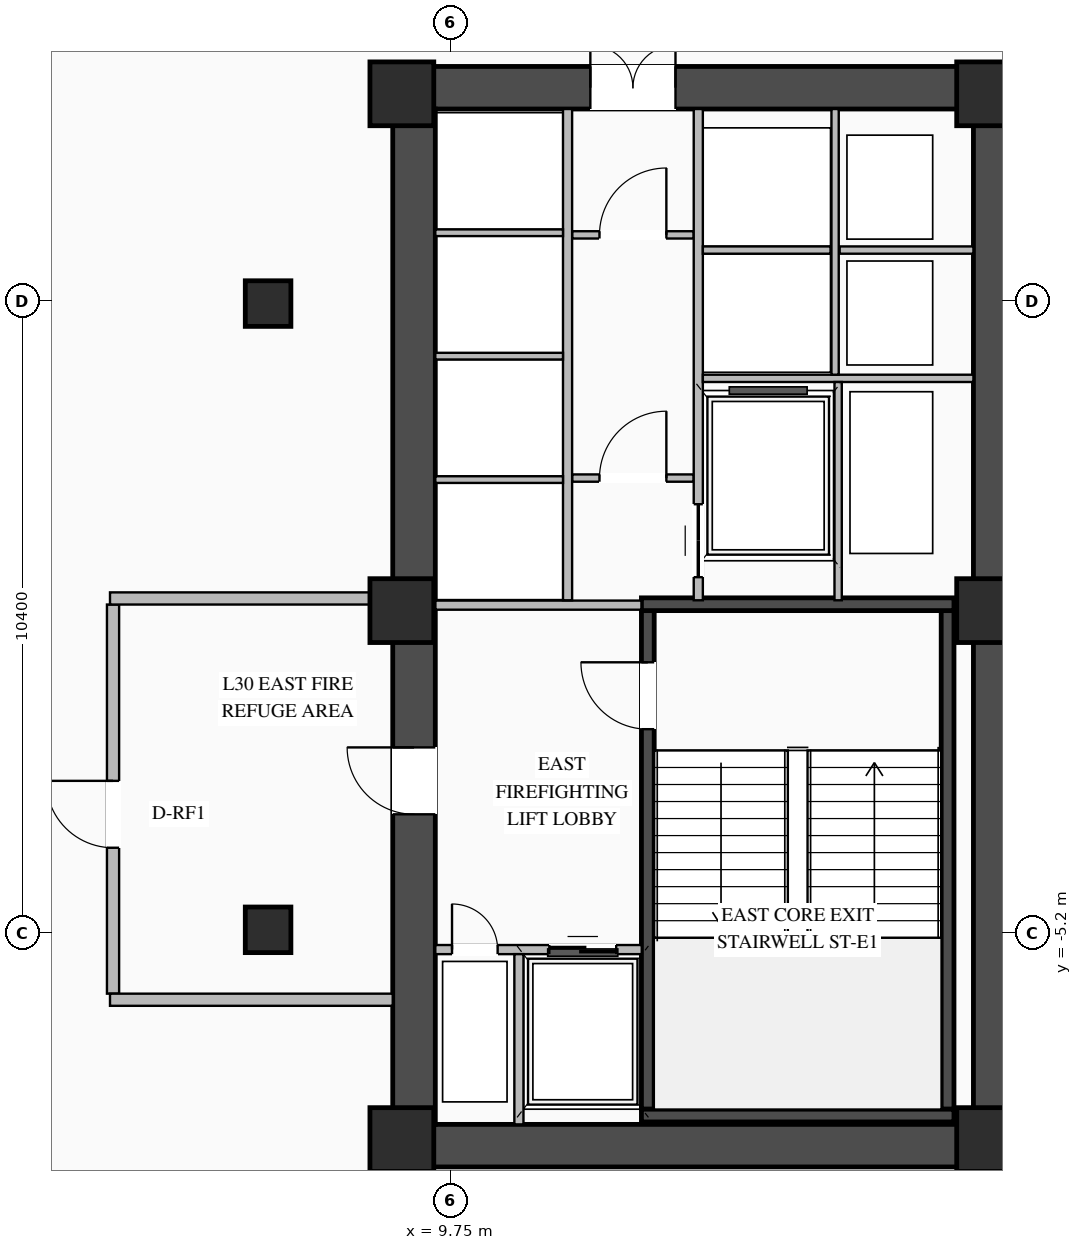
"""IFC4 building model, lengths in metres.
Left out: names, types, materials, properties, quantities, classifications, styles, units other than length and angle.
Written with IfcOpenShell. Run it as: python <this file> out.ifc"""

import sys

from ifc_helpers import new_model, si_unit, direction, frame, frame_2d, origin, origin_2d, place, context, subcontext, project, spatial, rectangle, i_section, extrude, element, fill, save


model = new_model("IFC4")
c1 = context("Model", 3, precision=1e-05, world=origin(), true_north=direction((0.0, 1.0)))
c2 = subcontext(c1, "Body", "Model", "MODEL_VIEW")
j1 = project(units=[si_unit("LENGTHUNIT", "METRE"), si_unit("PLANEANGLEUNIT", "RADIAN")], contexts=[c1])
p1 = place(None, origin())
s1 = spatial("IfcSite", under=j1, at=p1, CompositionType="ELEMENT")
p2 = place(p1, origin())
s2 = spatial("IfcBuilding", under=s1, at=p2, CompositionType="ELEMENT")
p3 = place(p2, frame((0.0, 0.0, 112.15)))
s3 = spatial("IfcBuildingStorey", under=s2, at=p3, CompositionType="ELEMENT", Elevation=112.15)
p4 = place(p3, frame((8.8, -8.7, 0.0), z_axis=(0.0, 0.0, 1.0), x_axis=(1.0, 0.0, 0.0)))
e1 = element("IfcWall", 1, at=p4, inside=s3, PredefinedType="SHEAR", context=c2, shape_type="SweptSolid", body=[
    extrude(rectangle(XDim=10.25, YDim=0.7, at=frame_2d((5.125, 0.0))), origin(), (0.0, 0.0, 1.0), 4.22),
])
p5 = place(p3, frame((8.8, 8.7, 0.0), z_axis=(0.0, 0.0, 1.0), x_axis=(1.0, 0.0, 0.0)))
e2 = element("IfcWall", 2, at=p5, inside=s3, PredefinedType="SHEAR", context=c2, shape_type="SweptSolid", body=[
    extrude(rectangle(XDim=10.25, YDim=0.7, at=frame_2d((5.125, 0.0))), origin(), (0.0, 0.0, 1.0), 4.22),
])
p6 = place(p5, frame((3.25, 0.0, 0.0)))
e3 = element("IfcOpeningElement", 3, at=p6, cuts=e2, PredefinedType="OPENING", context=c2, shape_type="SweptSolid", body=[
    extrude(rectangle(XDim=1.4, YDim=2.05, at=frame_2d((0.7, 1.025))), frame((0.0, 0.36, 0.0), z_axis=(0.0, -1.0, 0.0), x_axis=(1.0, 0.0, 0.0)), (0.0, 0.0, 1.0), 0.72),
])
p7 = place(p3, frame((9.15, -8.35, 0.0), z_axis=(0.0, 0.0, 1.0), x_axis=(0.0, 1.0, 0.0)))
e4 = element("IfcWall", 4, at=p7, inside=s3, PredefinedType="SHEAR", context=c2, shape_type="SweptSolid", body=[
    extrude(rectangle(XDim=16.7, YDim=0.7, at=frame_2d((8.35, 0.0))), origin(), (0.0, 0.0, 1.0), 4.22),
])
p8 = place(p7, frame((5.1, 0.0, 0.0)))
e5 = element("IfcOpeningElement", 5, at=p8, cuts=e4, PredefinedType="OPENING", context=c2, shape_type="SweptSolid", body=[
    extrude(rectangle(XDim=1.1, YDim=2.08, at=frame_2d((0.55, 1.04))), frame((0.0, 0.36, 0.0), z_axis=(0.0, -1.0, 0.0), x_axis=(1.0, 0.0, 0.0)), (0.0, 0.0, 1.0), 0.72),
])
p9 = place(p3, frame((18.7, -8.35, 0.0), z_axis=(0.0, 0.0, 1.0), x_axis=(0.0, 1.0, 0.0)))
e6 = element("IfcWall", 6, at=p9, inside=s3, PredefinedType="SHEAR", context=c2, shape_type="SweptSolid", body=[
    extrude(rectangle(XDim=16.7, YDim=0.7, at=frame_2d((8.35, 0.0))), origin(), (0.0, 0.0, 1.0), 4.22),
])
p10 = place(p3, frame((12.995, -8.1, 0.0), z_axis=(0.0, 0.0, 1.0), x_axis=(0.0, 1.0, 0.0)))
e7 = element("IfcWall", 7, at=p10, inside=s3, PredefinedType="SHEAR", context=c2, shape_type="SweptSolid", body=[
    extrude(rectangle(XDim=8.2, YDim=0.21, at=frame_2d((4.1, 0.0))), origin(), (0.0, 0.0, 1.0), 4.22),
])
p11 = place(p10, frame((6.25, 0.0, 0.0)))
e8 = element("IfcOpeningElement", 8, at=p11, cuts=e7, PredefinedType="OPENING", context=c2, shape_type="SweptSolid", body=[
    extrude(rectangle(XDim=1.1, YDim=2.15, at=frame_2d((0.55, 1.075))), frame((0.0, 0.115, 0.0), z_axis=(0.0, -1.0, 0.0), x_axis=(1.0, 0.0, 0.0)), (0.0, 0.0, 1.0), 0.23),
])
p12 = place(p3, frame((17.925, -8.1, 0.0), z_axis=(0.0, 0.0, 1.0), x_axis=(0.0, 1.0, 0.0)))
e9 = element("IfcWall", 9, at=p12, inside=s3, PredefinedType="SHEAR", context=c2, shape_type="SweptSolid", body=[
    extrude(rectangle(XDim=8.2, YDim=0.21, at=frame_2d((4.1, 0.0))), origin(), (0.0, 0.0, 1.0), 4.22),
])
for number, where, z_axis, x_axis in (
    (10, (12.89, -8.205, 0.0), (0.0, 0.0, 1.0), (1.0, 0.0, 0.0)),
    (11, (18.03, 0.205, 0.0), (0.0, 0.0, 1.0), (-1.0, 0.0, 0.0)),
):
    element("IfcWall", number, at=place(p3, frame(where, z_axis=z_axis, x_axis=x_axis)), inside=s3, PredefinedType="SHEAR", context=c2, shape_type="SweptSolid", body=[
        extrude(rectangle(XDim=5.14, YDim=0.21, at=frame_2d((2.57, 0.0))), origin(), (0.0, 0.0, 1.0), 4.22),
    ])
for number, where, z_axis, x_axis in (
    (12, (8.95, -8.6, 0.0), (0.0, 0.0, 1.0), (1.0, 0.0, 0.0)),
    (13, (8.95, 0.1, 0.0), (0.0, 0.0, 1.0), (1.0, 0.0, 0.0)),
    (14, (8.95, 8.6, 0.0), (0.0, 0.0, 1.0), (1.0, 0.0, 0.0)),
    (15, (18.6, -8.6, 0.0), (0.0, 0.0, 1.0), (1.0, 0.0, 0.0)),
    (16, (18.6, 0.1, 0.0), (0.0, 0.0, 1.0), (1.0, 0.0, 0.0)),
    (17, (18.6, 8.6, 0.0), (0.0, 0.0, 1.0), (1.0, 0.0, 0.0)),
):
    element("IfcColumn", number, at=place(p3, frame(where, z_axis=z_axis, x_axis=x_axis)), inside=s3, PredefinedType="COLUMN", context=c2, shape_type="SweptSolid", body=[
        extrude(rectangle(XDim=1.05, YDim=1.05, at=origin_2d()), origin(), (0.0, 0.0, 1.0), 4.5),
    ])
for number, where, z_axis, x_axis in (
    (18, (6.75, -5.15, 0.0), (0.0, 0.0, 1.0), (1.0, 0.0, 0.0)),
    (19, (6.75, 5.15, 0.0), (0.0, 0.0, 1.0), (1.0, 0.0, 0.0)),
):
    element("IfcColumn", number, at=place(p3, frame(where, z_axis=z_axis, x_axis=x_axis)), inside=s3, PredefinedType="COLUMN", context=c2, shape_type="SweptSolid", body=[
        extrude(i_section(OverallWidth=0.75, OverallDepth=0.75, WebThickness=0.03, FlangeThickness=0.044, at=origin_2d()), origin(), (0.0, 0.0, 1.0), 4.5),
    ])
p13 = place(p3, frame((9.5, -5.475, 0.0), z_axis=(0.0, 0.0, 1.0), x_axis=(1.0, 0.0, 0.0)))
e20 = element("IfcWall", 20, at=p13, inside=s3, PredefinedType="STANDARD", context=c2, shape_type="SweptSolid", body=[
    extrude(rectangle(XDim=3.395, YDim=0.15, at=frame_2d((1.698, 0.0))), origin(), (0.0, 0.0, 1.0), 4.2),
])
p14 = place(p13, frame((1.875, 0.0, 0.0)))
e21 = element("IfcOpeningElement", 21, at=p14, cuts=e20, PredefinedType="OPENING", context=c2, shape_type="SweptSolid", body=[
    extrude(rectangle(XDim=1.1, YDim=2.15, at=frame_2d((0.55, 1.075))), frame((0.0, 0.085, 0.0), z_axis=(0.0, -1.0, 0.0), x_axis=(1.0, 0.0, 0.0)), (0.0, 0.0, 1.0), 0.17),
])
p15 = place(p13, frame((0.275, 0.0, 0.0)))
e22 = element("IfcOpeningElement", 22, at=p15, cuts=e20, PredefinedType="OPENING", context=c2, shape_type="SweptSolid", body=[
    extrude(rectangle(XDim=0.75, YDim=2.05, at=frame_2d((0.375, 1.025))), frame((0.0, 0.085, 0.0), z_axis=(0.0, -1.0, 0.0), x_axis=(1.0, 0.0, 0.0)), (0.0, 0.0, 1.0), 0.17),
])
p16 = place(p3, frame((10.875, -8.35, 0.0), z_axis=(0.0, 0.0, 1.0), x_axis=(0.0, 1.0, 0.0)))
e23 = element("IfcWall", 23, at=p16, inside=s3, PredefinedType="STANDARD", context=c2, shape_type="SweptSolid", body=[
    extrude(rectangle(XDim=2.8, YDim=0.15, at=frame_2d((1.4, 0.0))), origin(), (0.0, 0.0, 1.0), 4.2),
])
p17 = place(p3, frame((9.5, 0.19, 0.0), z_axis=(0.0, 0.0, 1.0), x_axis=(1.0, 0.0, 0.0)))
e24 = element("IfcWall", 24, at=p17, inside=s3, PredefinedType="STANDARD", context=c2, shape_type="SweptSolid", body=[
    extrude(rectangle(XDim=3.39, YDim=0.15, at=frame_2d((1.695, 0.0))), origin(), (0.0, 0.0, 1.0), 3.595),
])
p18 = place(p3, frame((11.75, 2.28, 0.0), z_axis=(0.0, 0.0, 1.0), x_axis=(1.0, 0.0, 0.0)))
e25 = element("IfcWall", 25, at=p18, inside=s3, PredefinedType="STANDARD", context=c2, shape_type="SweptSolid", body=[
    extrude(rectangle(XDim=2.0, YDim=0.12, at=frame_2d((1.0, 0.0))), origin(), (0.0, 0.0, 1.0), 4.2),
])
p19 = place(p18, frame((0.45, 0.0, 0.0)))
e26 = element("IfcOpeningElement", 26, at=p19, cuts=e25, PredefinedType="OPENING", context=c2, shape_type="SweptSolid", body=[
    extrude(rectangle(XDim=1.1, YDim=2.1, at=frame_2d((0.55, 1.05))), frame((0.0, 0.07, 0.0), z_axis=(0.0, -1.0, 0.0), x_axis=(1.0, 0.0, 0.0)), (0.0, 0.0, 1.0), 0.14),
])
p20 = place(p3, frame((11.75, 6.28, 0.0), z_axis=(0.0, 0.0, 1.0), x_axis=(1.0, 0.0, 0.0)))
e27 = element("IfcWall", 27, at=p20, inside=s3, PredefinedType="STANDARD", context=c2, shape_type="SweptSolid", body=[
    extrude(rectangle(XDim=2.0, YDim=0.12, at=frame_2d((1.0, 0.0))), origin(), (0.0, 0.0, 1.0), 4.2),
])
p21 = place(p20, frame((0.45, 0.0, 0.0)))
e28 = element("IfcOpeningElement", 28, at=p21, cuts=e27, PredefinedType="OPENING", context=c2, shape_type="SweptSolid", body=[
    extrude(rectangle(XDim=1.1, YDim=2.1, at=frame_2d((0.55, 1.05))), frame((0.0, 0.07, 0.0), z_axis=(0.0, -1.0, 0.0), x_axis=(1.0, 0.0, 0.0)), (0.0, 0.0, 1.0), 0.14),
])
p22 = place(p3, frame((11.675, 0.27, 0.0), z_axis=(0.0, 0.0, 1.0), x_axis=(0.0, 1.0, 0.0)))
e29 = element("IfcWall", 29, at=p22, inside=s3, PredefinedType="STANDARD", context=c2, shape_type="SweptSolid", body=[
    extrude(rectangle(XDim=8.08, YDim=0.15, at=frame_2d((4.04, 0.0))), origin(), (0.0, 0.0, 1.0), 4.2),
])
for number, where, z_axis, x_axis in (
    (30, (9.5, 2.255, 0.0), (0.0, 0.0, 1.0), (1.0, 0.0, 0.0)),
    (31, (9.5, 4.285, 0.0), (0.0, 0.0, 1.0), (1.0, 0.0, 0.0)),
    (32, (9.5, 6.315, 0.0), (0.0, 0.0, 1.0), (1.0, 0.0, 0.0)),
):
    element("IfcWall", number, at=place(p3, frame(where, z_axis=z_axis, x_axis=x_axis)), inside=s3, PredefinedType="STANDARD", context=c2, shape_type="SweptSolid", body=[
        extrude(rectangle(XDim=2.1, YDim=0.11, at=frame_2d((1.05, 0.0))), origin(), (0.0, 0.0, 1.0), 4.2),
    ])
p23 = place(p3, frame((13.825, 0.27, 0.0), z_axis=(0.0, 0.0, 1.0), x_axis=(0.0, 1.0, 0.0)))
e33 = element("IfcWall", 33, at=p23, inside=s3, PredefinedType="STANDARD", context=c2, shape_type="SweptSolid", body=[
    extrude(rectangle(XDim=8.08, YDim=0.15, at=frame_2d((4.04, 0.0))), origin(), (0.0, 0.0, 1.0), 4.2),
])
p24 = place(p23, frame((0.38, 0.0, 0.0)))
e34 = element("IfcOpeningElement", 34, at=p24, cuts=e33, PredefinedType="OPENING", context=c2, shape_type="SweptSolid", body=[
    extrude(rectangle(XDim=1.2, YDim=2.1, at=frame_2d((0.6, 1.05))), frame((0.0, 0.085, 0.0), z_axis=(0.0, -1.0, 0.0), x_axis=(1.0, 0.0, 0.0)), (0.0, 0.0, 1.0), 0.17),
])
p25 = place(p3, frame((13.9, 3.92, 0.0), z_axis=(0.0, 0.0, 1.0), x_axis=(1.0, 0.0, 0.0)))
e35 = element("IfcWall", 35, at=p25, inside=s3, PredefinedType="STANDARD", context=c2, shape_type="SweptSolid", body=[
    extrude(rectangle(XDim=4.45, YDim=0.12, at=frame_2d((2.225, 0.0))), origin(), (0.0, 0.0, 1.0), 4.2),
])
p26 = place(p3, frame((16.15, 6.03, 0.0), z_axis=(0.0, 0.0, 1.0), x_axis=(1.0, 0.0, 0.0)))
e36 = element("IfcWall", 36, at=p26, inside=s3, PredefinedType="STANDARD", context=c2, shape_type="SweptSolid", body=[
    extrude(rectangle(XDim=2.2, YDim=0.12, at=frame_2d((1.1, 0.0))), origin(), (0.0, 0.0, 1.0), 4.2),
])
p27 = place(p3, frame((16.075, 3.98, 0.0), z_axis=(0.0, 0.0, 1.0), x_axis=(0.0, 1.0, 0.0)))
e37 = element("IfcWall", 37, at=p27, inside=s3, PredefinedType="STANDARD", context=c2, shape_type="SweptSolid", body=[
    extrude(rectangle(XDim=4.37, YDim=0.12, at=frame_2d((2.185, 0.0))), origin(), (0.0, 0.0, 1.0), 4.2),
])
p28 = place(p3, frame((13.9, 6.03, 0.0), z_axis=(0.0, 0.0, 1.0), x_axis=(1.0, 0.0, 0.0)))
e38 = element("IfcWall", 38, at=p28, inside=s3, PredefinedType="STANDARD", context=c2, shape_type="SweptSolid", body=[
    extrude(rectangle(XDim=2.1, YDim=0.12, at=frame_2d((1.05, 0.0))), origin(), (0.0, 0.0, 1.0), 4.2),
])
p29 = place(p3, frame((16.125, 0.27, 0.0), z_axis=(0.0, 0.0, 1.0), x_axis=(0.0, 1.0, 0.0)))
e39 = element("IfcWall", 39, at=p29, inside=s3, PredefinedType="STANDARD", context=c2, shape_type="SweptSolid", body=[
    extrude(rectangle(XDim=3.59, YDim=0.12, at=frame_2d((1.795, 0.0))), origin(), (0.0, 0.0, 1.0), 4.2),
])
p30 = place(p3, frame((4.2, -6.2, 0.0), z_axis=(0.0, 0.0, 1.0), x_axis=(0.0, 1.0, 0.0)))
e40 = element("IfcWall", 40, at=p30, inside=s3, PredefinedType="STANDARD", context=c2, shape_type="SweptSolid", body=[
    extrude(rectangle(XDim=6.4, YDim=0.2, at=frame_2d((3.2, 0.0))), origin(), (0.0, 0.0, 1.0), 4.2),
])
p31 = place(p30, frame((2.4, 0.0, 0.0)))
e41 = element("IfcOpeningElement", 41, at=p31, cuts=e40, PredefinedType="OPENING", context=c2, shape_type="SweptSolid", body=[
    extrude(rectangle(XDim=1.1, YDim=2.08, at=frame_2d((0.55, 1.04))), frame((0.0, 0.11, 0.0), z_axis=(0.0, -1.0, 0.0), x_axis=(1.0, 0.0, 0.0)), (0.0, 0.0, 1.0), 0.22),
])
for number, where, z_axis, x_axis in (
    (42, (4.15, -6.3, 0.0), (0.0, 0.0, 1.0), (1.0, 0.0, 0.0)),
    (43, (4.15, 0.3, 0.0), (0.0, 0.0, 1.0), (1.0, 0.0, 0.0)),
):
    element("IfcWall", number, at=place(p3, frame(where, z_axis=z_axis, x_axis=x_axis)), inside=s3, PredefinedType="STANDARD", context=c2, shape_type="SweptSolid", body=[
        extrude(rectangle(XDim=4.65, YDim=0.2, at=frame_2d((2.325, 0.0))), origin(), (0.0, 0.0, 1.0), 4.2),
    ])
p32 = place(p11, origin())
e44 = element("IfcDoor", 44, at=p32, inside=s3, OperationType="SINGLE_SWING_RIGHT", PredefinedType="DOOR", context=c2, shape_type="SweptSolid", body=[
    extrude(rectangle(XDim=1.1, YDim=2.15, at=frame_2d((0.55, 1.075))), frame((0.0, 0.025, 0.0), z_axis=(0.0, -1.0, 0.0), x_axis=(1.0, 0.0, 0.0)), (0.0, 0.0, 1.0), 0.05),
])
fill(e8, e44)
p33 = place(p14, origin())
e45 = element("IfcDoor", 45, at=p33, inside=s3, OperationType="DOUBLE_DOOR_SLIDING", PredefinedType="DOOR", context=c2, shape_type="SweptSolid", body=[
    extrude(rectangle(XDim=1.1, YDim=2.15, at=frame_2d((0.55, 1.075))), frame((0.0, 0.025, 0.0), z_axis=(0.0, -1.0, 0.0), x_axis=(1.0, 0.0, 0.0)), (0.0, 0.0, 1.0), 0.05),
])
fill(e21, e45)
p34 = place(p15, origin())
e46 = element("IfcDoor", 46, at=p34, inside=s3, OperationType="SINGLE_SWING_LEFT", PredefinedType="DOOR", context=c2, shape_type="SweptSolid", body=[
    extrude(rectangle(XDim=0.75, YDim=2.05, at=frame_2d((0.375, 1.025))), frame((0.0, 0.025, 0.0), z_axis=(0.0, -1.0, 0.0), x_axis=(1.0, 0.0, 0.0)), (0.0, 0.0, 1.0), 0.05),
])
fill(e22, e46)
p35 = place(p8, origin())
e47 = element("IfcDoor", 47, at=p35, inside=s3, OperationType="SINGLE_SWING_RIGHT", PredefinedType="DOOR", context=c2, shape_type="SweptSolid", body=[
    extrude(rectangle(XDim=1.1, YDim=2.08, at=frame_2d((0.55, 1.04))), frame((0.0, -0.255, 0.0), z_axis=(0.0, -1.0, 0.0), x_axis=(1.0, 0.0, 0.0)), (0.0, 0.0, 1.0), 0.05),
])
fill(e5, e47)
p36 = place(p19, origin())
e48 = element("IfcDoor", 48, at=p36, inside=s3, OperationType="SINGLE_SWING_RIGHT", PredefinedType="DOOR", context=c2, shape_type="SweptSolid", body=[
    extrude(rectangle(XDim=1.1, YDim=2.1, at=frame_2d((0.55, 1.05))), frame((0.0, 0.025, 0.0), z_axis=(0.0, -1.0, 0.0), x_axis=(1.0, 0.0, 0.0)), (0.0, 0.0, 1.0), 0.05),
])
fill(e26, e48)
p37 = place(p21, origin())
e49 = element("IfcDoor", 49, at=p37, inside=s3, OperationType="SINGLE_SWING_RIGHT", PredefinedType="DOOR", context=c2, shape_type="SweptSolid", body=[
    extrude(rectangle(XDim=1.1, YDim=2.1, at=frame_2d((0.55, 1.05))), frame((0.0, 0.025, 0.0), z_axis=(0.0, -1.0, 0.0), x_axis=(1.0, 0.0, 0.0)), (0.0, 0.0, 1.0), 0.05),
])
fill(e28, e49)
p38 = place(p6, origin())
e50 = element("IfcDoor", 50, at=p38, inside=s3, OperationType="DOUBLE_DOOR_SINGLE_SWING", PredefinedType="DOOR", context=c2, shape_type="SweptSolid", body=[
    extrude(rectangle(XDim=1.4, YDim=2.05, at=frame_2d((0.7, 1.025))), frame((0.0, 0.295, 0.0), z_axis=(0.0, -1.0, 0.0), x_axis=(1.0, 0.0, 0.0)), (0.0, 0.0, 1.0), 0.05),
])
fill(e3, e50)
p39 = place(p24, origin())
e51 = element("IfcDoor", 51, at=p39, inside=s3, OperationType="DOUBLE_DOOR_SLIDING", PredefinedType="DOOR", context=c2, shape_type="SweptSolid", body=[
    extrude(rectangle(XDim=1.2, YDim=2.1, at=frame_2d((0.6, 1.05))), frame((0.0, 0.025, 0.0), z_axis=(0.0, -1.0, 0.0), x_axis=(1.0, 0.0, 0.0)), (0.0, 0.0, 1.0), 0.05),
])
fill(e34, e51)
p40 = place(p31, origin())
e52 = element("IfcDoor", 52, at=p40, inside=s3, OperationType="SINGLE_SWING_RIGHT", PredefinedType="DOOR", context=c2, shape_type="SweptSolid", body=[
    extrude(rectangle(XDim=1.1, YDim=2.08, at=frame_2d((0.55, 1.04))), frame((0.0, 0.025, 0.0), z_axis=(0.0, -1.0, 0.0), x_axis=(1.0, 0.0, 0.0)), (0.0, 0.0, 1.0), 0.05),
])
fill(e41, e52)
save(model, sys.argv[1])
